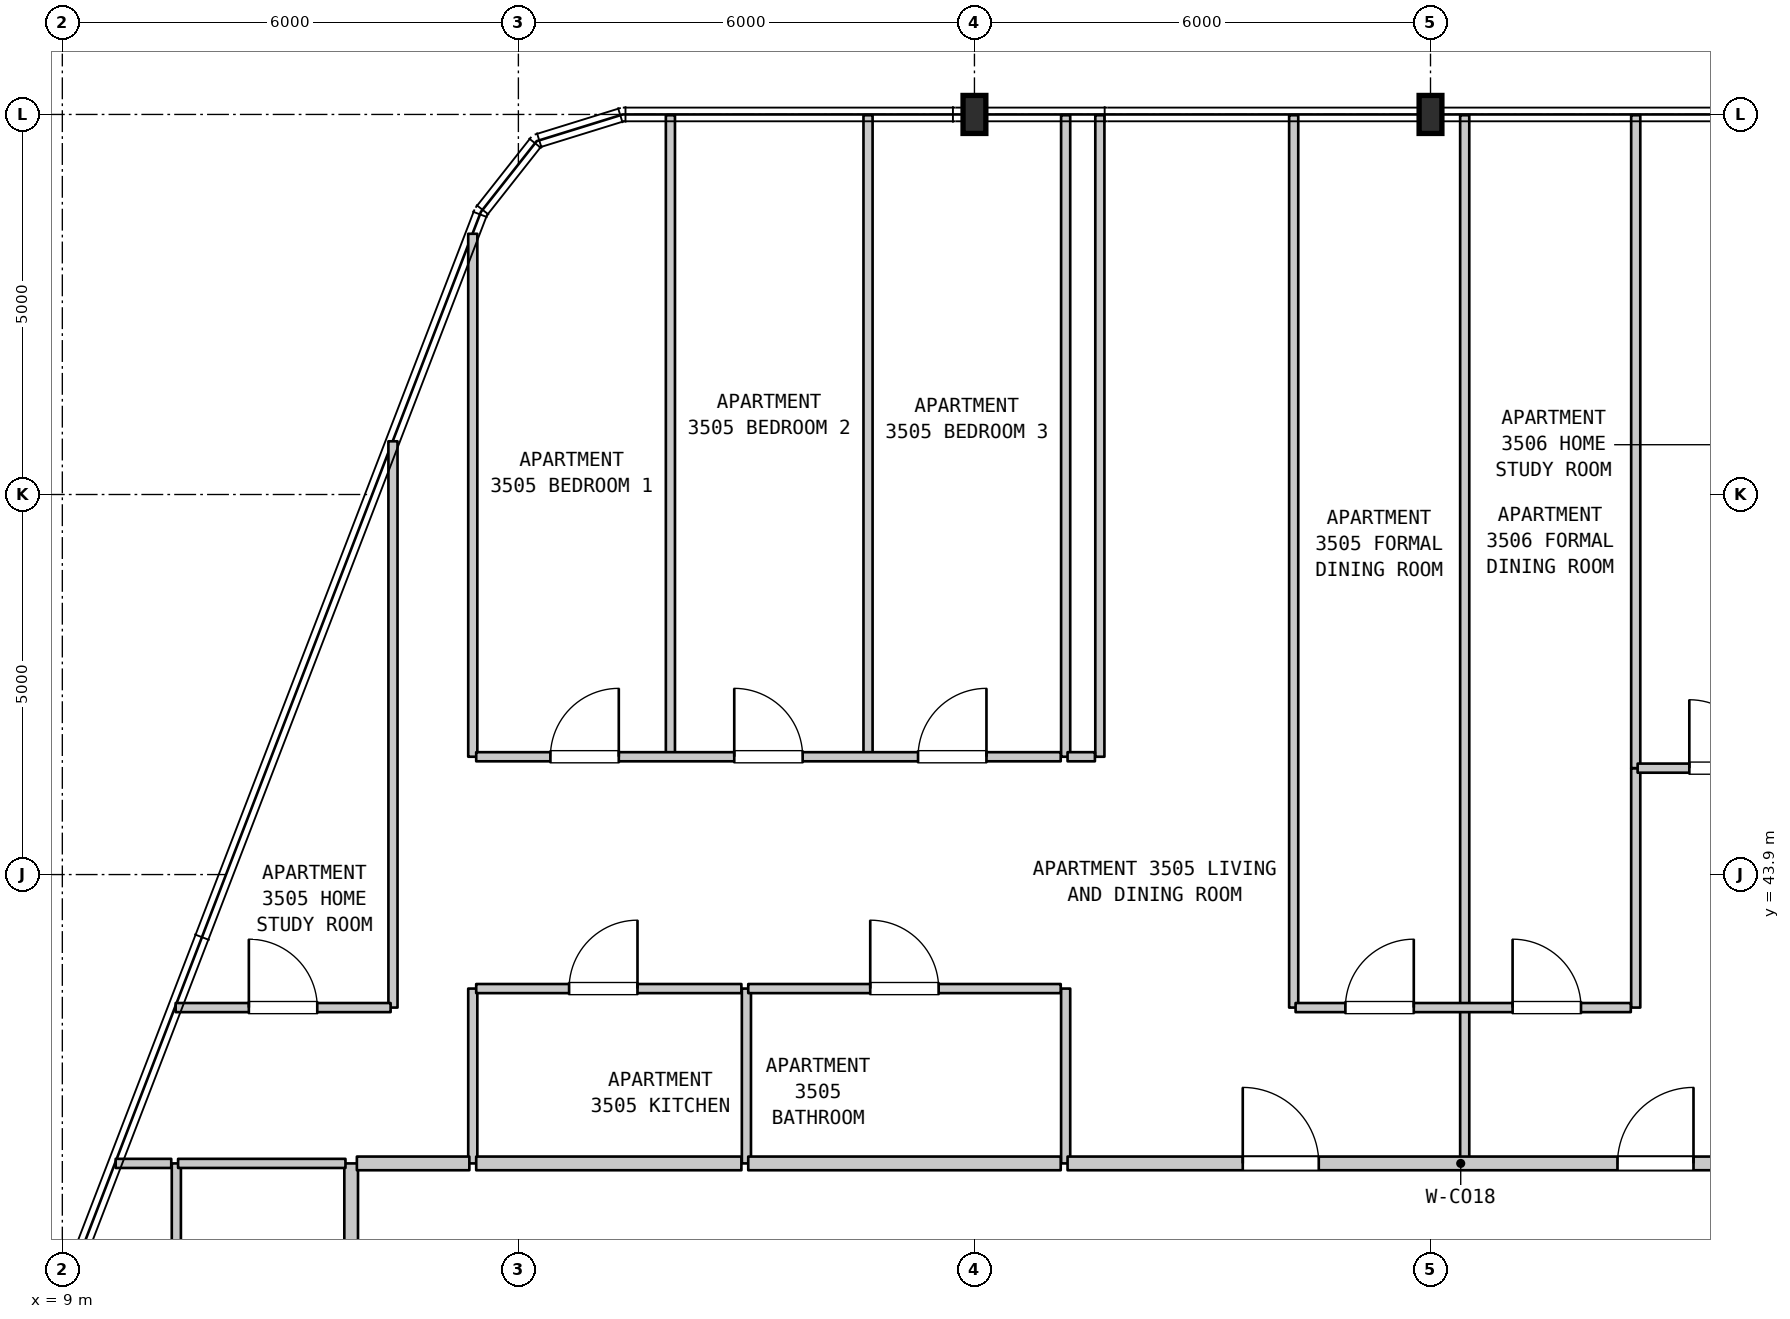
"""IFC4 building model, lengths in metres.
Left out: names, types, materials, properties, quantities, classifications, styles, units other than length and angle.
Written with IfcOpenShell. Run it as: python <this file> out.ifc"""

import sys

from ifc_helpers import new_model, si_unit, direction, frame, frame_2d, origin, origin_2d, place, context, subcontext, project, spatial, rectangle, i_section, extrude, element, fill, save


model = new_model("IFC4")
c1 = context("Model", 3, precision=1e-05, world=origin(), true_north=direction((0.0, 1.0)))
c2 = subcontext(c1, "Body", "Model", "MODEL_VIEW")
j1 = project(units=[si_unit("LENGTHUNIT", "METRE"), si_unit("PLANEANGLEUNIT", "RADIAN")], contexts=[c1])
p1 = place(None, origin())
s1 = spatial("IfcSite", under=j1, at=p1, CompositionType="ELEMENT")
p2 = place(p1, origin())
s2 = spatial("IfcBuilding", under=s1, at=p2, CompositionType="ELEMENT")
p3 = place(p2, frame((0.0, 0.0, 144.6)))
s3 = spatial("IfcBuildingStorey", under=s2, at=p3, CompositionType="ELEMENT", Elevation=144.6)
for number, where, z_axis, x_axis in (
    (1, (21.0, 53.9, 0.0), (0.0, 0.0, 1.0), (1.0, 0.0, 0.0)),
    (2, (27.0, 53.9, 0.0), (0.0, 0.0, 1.0), (1.0, 0.0, 0.0)),
):
    element("IfcColumn", number, at=place(p3, frame(where, z_axis=z_axis, x_axis=x_axis)), inside=s3, PredefinedType="COLUMN", context=c2, shape_type="SweptSolid", body=[
        extrude(i_section(OverallWidth=0.3, OverallDepth=0.5, WebThickness=0.014, FlangeThickness=0.028, FilletRadius=0.027, at=origin_2d()), origin(), (0.0, 0.0, 1.0), 3.7),
    ])
p4 = place(p3, frame((10.5, 31.09, 0.0), z_axis=(0.0, 0.0, 1.0), x_axis=(0.0, 1.0, 0.0)))
e3 = element("IfcWall", 3, at=p4, inside=s3, PredefinedType="PARTITIONING", context=c2, shape_type="SweptSolid", body=[
    extrude(rectangle(XDim=9.01, YDim=0.12, at=frame_2d((4.505, 0.0))), origin(), (0.0, 0.0, 1.0), 3.385),
])
p5 = place(p3, frame((12.8, 31.09, 0.0), z_axis=(0.0, 0.0, 1.0), x_axis=(0.0, 1.0, 0.0)))
e4 = element("IfcWall", 4, at=p5, inside=s3, PredefinedType="STANDARD", context=c2, shape_type="SweptSolid", body=[
    extrude(rectangle(XDim=9.01, YDim=0.18, at=frame_2d((4.505, 0.0))), origin(), (0.0, 0.0, 1.0), 3.385),
])
p6 = place(p3, frame((13.35, 42.15, 0.0), z_axis=(0.0, 0.0, 1.0), x_axis=(0.0, 1.0, 0.0)))
e5 = element("IfcWall", 5, at=p6, inside=s3, PredefinedType="PARTITIONING", context=c2, shape_type="SweptSolid", body=[
    extrude(rectangle(XDim=7.45, YDim=0.12, at=frame_2d((3.725, 0.0))), origin(), (0.0, 0.0, 1.0), 3.385),
])
p7 = place(p3, frame((14.4, 40.1, 0.0), z_axis=(0.0, 0.0, 1.0), x_axis=(0.0, 1.0, 0.0)))
e6 = element("IfcWall", 6, at=p7, inside=s3, PredefinedType="PARTITIONING", context=c2, shape_type="SweptSolid", body=[
    extrude(rectangle(XDim=2.3, YDim=0.12, at=frame_2d((1.15, 0.0))), origin(), (0.0, 0.0, 1.0), 3.385),
])
p8 = place(p3, frame((14.4, 45.45, 0.0), z_axis=(0.0, 0.0, 1.0), x_axis=(0.0, 1.0, 0.0)))
e7 = element("IfcWall", 7, at=p8, inside=s3, PredefinedType="PARTITIONING", context=c2, shape_type="SweptSolid", body=[
    extrude(rectangle(XDim=6.88, YDim=0.12, at=frame_2d((3.44, 0.0))), origin(), (0.0, 0.0, 1.0), 3.385),
])
p9 = place(p3, frame((17.0, 45.45, 0.0), z_axis=(0.0, 0.0, 1.0), x_axis=(0.0, 1.0, 0.0)))
e8 = element("IfcWall", 8, at=p9, inside=s3, PredefinedType="PARTITIONING", context=c2, shape_type="SweptSolid", body=[
    extrude(rectangle(XDim=8.44, YDim=0.12, at=frame_2d((4.22, 0.0))), origin(), (0.0, 0.0, 1.0), 3.385),
])
p10 = place(p3, frame((18.0, 40.1, 0.0), z_axis=(0.0, 0.0, 1.0), x_axis=(0.0, 1.0, 0.0)))
e9 = element("IfcWall", 9, at=p10, inside=s3, PredefinedType="PARTITIONING", context=c2, shape_type="SweptSolid", body=[
    extrude(rectangle(XDim=2.3, YDim=0.12, at=frame_2d((1.15, 0.0))), origin(), (0.0, 0.0, 1.0), 3.385),
])
p11 = place(p3, frame((19.6, 45.45, 0.0), z_axis=(0.0, 0.0, 1.0), x_axis=(0.0, 1.0, 0.0)))
e10 = element("IfcWall", 10, at=p11, inside=s3, PredefinedType="PARTITIONING", context=c2, shape_type="SweptSolid", body=[
    extrude(rectangle(XDim=8.44, YDim=0.12, at=frame_2d((4.22, 0.0))), origin(), (0.0, 0.0, 1.0), 3.385),
])
p12 = place(p3, frame((22.2, 40.1, 0.0), z_axis=(0.0, 0.0, 1.0), x_axis=(0.0, 1.0, 0.0)))
e11 = element("IfcWall", 11, at=p12, inside=s3, PredefinedType="PARTITIONING", context=c2, shape_type="SweptSolid", body=[
    extrude(rectangle(XDim=2.3, YDim=0.12, at=frame_2d((1.15, 0.0))), origin(), (0.0, 0.0, 1.0), 3.385),
])
for number, where, z_axis, x_axis in (
    (12, (22.2, 45.45, 0.0), (0.0, 0.0, 1.0), (0.0, 1.0, 0.0)),
    (13, (22.65, 45.45, 0.0), (0.0, 0.0, 1.0), (0.0, 1.0, 0.0)),
):
    element("IfcWall", number, at=place(p3, frame(where, z_axis=z_axis, x_axis=x_axis)), inside=s3, PredefinedType="PARTITIONING", context=c2, shape_type="SweptSolid", body=[
        extrude(rectangle(XDim=8.44, YDim=0.12, at=frame_2d((4.22, 0.0))), origin(), (0.0, 0.0, 1.0), 3.385),
    ])
p13 = place(p3, frame((25.2, 42.15, 0.0), z_axis=(0.0, 0.0, 1.0), x_axis=(0.0, 1.0, 0.0)))
e14 = element("IfcWall", 14, at=p13, inside=s3, PredefinedType="PARTITIONING", context=c2, shape_type="SweptSolid", body=[
    extrude(rectangle(XDim=11.74, YDim=0.12, at=frame_2d((5.87, 0.0))), origin(), (0.0, 0.0, 1.0), 3.385),
])
p14 = place(p3, frame((27.45, 40.1, 0.0), z_axis=(0.0, 0.0, 1.0), x_axis=(0.0, 1.0, 0.0)))
e15 = element("IfcWall", 15, at=p14, inside=s3, PredefinedType="PARTITIONING", context=c2, shape_type="SweptSolid", body=[
    extrude(rectangle(XDim=2.05, YDim=0.12, at=frame_2d((1.025, 0.0))), origin(), (0.0, 0.0, 1.0), 3.385),
])
p15 = place(p3, frame((27.45, 42.15, 0.0), z_axis=(0.0, 0.0, 1.0), x_axis=(0.0, 1.0, 0.0)))
e16 = element("IfcWall", 16, at=p15, inside=s3, PredefinedType="PARTITIONING", context=c2, shape_type="SweptSolid", body=[
    extrude(rectangle(XDim=11.74, YDim=0.12, at=frame_2d((5.87, 0.0))), origin(), (0.0, 0.0, 1.0), 3.385),
])
p16 = place(p3, frame((29.7, 42.15, 0.0), z_axis=(0.0, 0.0, 1.0), x_axis=(0.0, 1.0, 0.0)))
e17 = element("IfcWall", 17, at=p16, inside=s3, PredefinedType="PARTITIONING", context=c2, shape_type="SweptSolid", body=[
    extrude(rectangle(XDim=3.15, YDim=0.12, at=frame_2d((1.575, 0.0))), origin(), (0.0, 0.0, 1.0), 3.385),
])
p17 = place(p3, frame((29.7, 45.3, 0.0), z_axis=(0.0, 0.0, 1.0), x_axis=(0.0, 1.0, 0.0)))
e18 = element("IfcWall", 18, at=p17, inside=s3, PredefinedType="PARTITIONING", context=c2, shape_type="SweptSolid", body=[
    extrude(rectangle(XDim=8.59, YDim=0.12, at=frame_2d((4.295, 0.0))), origin(), (0.0, 0.0, 1.0), 3.385),
])
p18 = place(p3, frame((9.702, 40.1, 0.0), z_axis=(0.0, 0.0, 1.0), x_axis=(1.0, 0.0, 0.0)))
e19 = element("IfcWall", 19, at=p18, inside=s3, PredefinedType="PARTITIONING", context=c2, shape_type="SweptSolid", body=[
    extrude(rectangle(XDim=0.731, YDim=0.12, at=frame_2d((0.366, 0.0))), origin(), (0.0, 0.0, 1.0), 3.385),
])
p19 = place(p3, frame((10.523, 40.1, 0.0), z_axis=(0.0, 0.0, 1.0), x_axis=(1.0, 0.0, 0.0)))
e20 = element("IfcWall", 20, at=p19, inside=s3, PredefinedType="PARTITIONING", context=c2, shape_type="SweptSolid", body=[
    extrude(rectangle(XDim=2.202, YDim=0.12, at=frame_2d((1.101, 0.0))), origin(), (0.0, 0.0, 1.0), 3.385),
])
p20 = place(p3, frame((12.875, 40.1, 0.0), z_axis=(0.0, 0.0, 1.0), x_axis=(1.0, 0.0, 0.0)))
e21 = element("IfcWall", 21, at=p20, inside=s3, PredefinedType="STANDARD", context=c2, shape_type="SweptSolid", body=[
    extrude(rectangle(XDim=1.48, YDim=0.18, at=frame_2d((0.74, 0.0))), origin(), (0.0, 0.0, 1.0), 3.385),
])
p21 = place(p3, frame((14.445, 40.1, 0.0), z_axis=(0.0, 0.0, 1.0), x_axis=(1.0, 0.0, 0.0)))
e22 = element("IfcWall", 22, at=p21, inside=s3, PredefinedType="STANDARD", context=c2, shape_type="SweptSolid", body=[
    extrude(rectangle(XDim=3.489, YDim=0.18, at=frame_2d((1.745, 0.0))), origin(), (0.0, 0.0, 1.0), 3.385),
])
p22 = place(p3, frame((18.024, 40.1, 0.0), z_axis=(0.0, 0.0, 1.0), x_axis=(1.0, 0.0, 0.0)))
e23 = element("IfcWall", 23, at=p22, inside=s3, PredefinedType="STANDARD", context=c2, shape_type="SweptSolid", body=[
    extrude(rectangle(XDim=4.111, YDim=0.18, at=frame_2d((2.056, 0.0))), origin(), (0.0, 0.0, 1.0), 3.385),
])
p23 = place(p3, frame((22.225, 40.1, 0.0), z_axis=(0.0, 0.0, 1.0), x_axis=(1.0, 0.0, 0.0)))
e24 = element("IfcWall", 24, at=p23, inside=s3, PredefinedType="STANDARD", context=c2, shape_type="SweptSolid", body=[
    extrude(rectangle(XDim=10.345, YDim=0.18, at=frame_2d((5.172, 0.0))), origin(), (0.0, 0.0, 1.0), 3.385),
])
p24 = place(p23, frame((2.305, 0.0, 0.0)))
e25 = element("IfcOpeningElement", 25, at=p24, cuts=e24, PredefinedType="OPENING", context=c2, shape_type="SweptSolid", body=[
    extrude(rectangle(XDim=1.0, YDim=2.15, at=frame_2d((0.5, 1.075))), frame((0.0, 0.1, 0.0), z_axis=(0.0, -1.0, 0.0), x_axis=(1.0, 0.0, 0.0)), (0.0, 0.0, 1.0), 0.2),
])
p25 = place(p23, frame((7.235, 0.0, 0.0)))
e26 = element("IfcOpeningElement", 26, at=p25, cuts=e24, PredefinedType="OPENING", context=c2, shape_type="SweptSolid", body=[
    extrude(rectangle(XDim=1.0, YDim=2.15, at=frame_2d((0.5, 1.075))), frame((0.0, 0.1, 0.0), z_axis=(0.0, -1.0, 0.0), x_axis=(1.0, 0.0, 0.0)), (0.0, 0.0, 1.0), 0.2),
])
p26 = place(p3, frame((10.491, 42.15, 0.0), z_axis=(0.0, 0.0, 1.0), x_axis=(1.0, 0.0, 0.0)))
e27 = element("IfcWall", 27, at=p26, inside=s3, PredefinedType="PARTITIONING", context=c2, shape_type="SweptSolid", body=[
    extrude(rectangle(XDim=2.828, YDim=0.12, at=frame_2d((1.414, 0.0))), origin(), (0.0, 0.0, 1.0), 3.385),
])
p27 = place(p26, frame((0.963, 0.0, 0.0)))
e28 = element("IfcOpeningElement", 28, at=p27, cuts=e27, PredefinedType="OPENING", context=c2, shape_type="SweptSolid", body=[
    extrude(rectangle(XDim=0.9, YDim=2.15, at=frame_2d((0.45, 1.075))), frame((0.0, 0.07, 0.0), z_axis=(0.0, -1.0, 0.0), x_axis=(1.0, 0.0, 0.0)), (0.0, 0.0, 1.0), 0.14),
])
p28 = place(p3, frame((25.225, 42.15, 0.0), z_axis=(0.0, 0.0, 1.0), x_axis=(1.0, 0.0, 0.0)))
e29 = element("IfcWall", 29, at=p28, inside=s3, PredefinedType="PARTITIONING", context=c2, shape_type="SweptSolid", body=[
    extrude(rectangle(XDim=4.41, YDim=0.12, at=frame_2d((2.205, 0.0))), origin(), (0.0, 0.0, 1.0), 3.385),
])
p29 = place(p28, frame((0.655, 0.0, 0.0)))
e30 = element("IfcOpeningElement", 30, at=p29, cuts=e29, PredefinedType="OPENING", context=c2, shape_type="SweptSolid", body=[
    extrude(rectangle(XDim=0.9, YDim=2.15, at=frame_2d((0.45, 1.075))), frame((0.0, 0.07, 0.0), z_axis=(0.0, -1.0, 0.0), x_axis=(1.0, 0.0, 0.0)), (0.0, 0.0, 1.0), 0.14),
])
p30 = place(p28, frame((2.855, 0.0, 0.0)))
e31 = element("IfcOpeningElement", 31, at=p30, cuts=e29, PredefinedType="OPENING", context=c2, shape_type="SweptSolid", body=[
    extrude(rectangle(XDim=0.9, YDim=2.15, at=frame_2d((0.45, 1.075))), frame((0.0, 0.07, 0.0), z_axis=(0.0, -1.0, 0.0), x_axis=(1.0, 0.0, 0.0)), (0.0, 0.0, 1.0), 0.14),
])
p31 = place(p3, frame((14.445, 42.4, 0.0), z_axis=(0.0, 0.0, 1.0), x_axis=(1.0, 0.0, 0.0)))
e32 = element("IfcWall", 32, at=p31, inside=s3, PredefinedType="PARTITIONING", context=c2, shape_type="SweptSolid", body=[
    extrude(rectangle(XDim=3.489, YDim=0.12, at=frame_2d((1.745, 0.0))), origin(), (0.0, 0.0, 1.0), 3.385),
])
p32 = place(p31, frame((1.222, 0.0, 0.0)))
e33 = element("IfcOpeningElement", 33, at=p32, cuts=e32, PredefinedType="OPENING", context=c2, shape_type="SweptSolid", body=[
    extrude(rectangle(XDim=0.9, YDim=2.15, at=frame_2d((0.45, 1.075))), frame((0.0, 0.07, 0.0), z_axis=(0.0, -1.0, 0.0), x_axis=(1.0, 0.0, 0.0)), (0.0, 0.0, 1.0), 0.14),
])
p33 = place(p3, frame((18.024, 42.4, 0.0), z_axis=(0.0, 0.0, 1.0), x_axis=(1.0, 0.0, 0.0)))
e34 = element("IfcWall", 34, at=p33, inside=s3, PredefinedType="PARTITIONING", context=c2, shape_type="SweptSolid", body=[
    extrude(rectangle(XDim=4.111, YDim=0.12, at=frame_2d((2.056, 0.0))), origin(), (0.0, 0.0, 1.0), 3.385),
])
p34 = place(p33, frame((1.605, 0.0, 0.0)))
e35 = element("IfcOpeningElement", 35, at=p34, cuts=e34, PredefinedType="OPENING", context=c2, shape_type="SweptSolid", body=[
    extrude(rectangle(XDim=0.9, YDim=2.1, at=frame_2d((0.45, 1.05))), frame((0.0, 0.07, 0.0), z_axis=(0.0, -1.0, 0.0), x_axis=(1.0, 0.0, 0.0)), (0.0, 0.0, 1.0), 0.14),
])
p35 = place(p3, frame((29.725, 45.3, 0.0), z_axis=(0.0, 0.0, 1.0), x_axis=(1.0, 0.0, 0.0)))
e36 = element("IfcWall", 36, at=p35, inside=s3, PredefinedType="PARTITIONING", context=c2, shape_type="SweptSolid", body=[
    extrude(rectangle(XDim=2.26, YDim=0.12, at=frame_2d((1.13, 0.0))), origin(), (0.0, 0.0, 1.0), 3.385),
])
p36 = place(p35, frame((0.68, 0.0, 0.0)))
e37 = element("IfcOpeningElement", 37, at=p36, cuts=e36, PredefinedType="OPENING", context=c2, shape_type="SweptSolid", body=[
    extrude(rectangle(XDim=0.9, YDim=2.15, at=frame_2d((0.45, 1.075))), frame((0.0, 0.07, 0.0), z_axis=(0.0, -1.0, 0.0), x_axis=(1.0, 0.0, 0.0)), (0.0, 0.0, 1.0), 0.14),
])
p37 = place(p3, frame((14.445, 45.45, 0.0), z_axis=(0.0, 0.0, 1.0), x_axis=(1.0, 0.0, 0.0)))
e38 = element("IfcWall", 38, at=p37, inside=s3, PredefinedType="PARTITIONING", context=c2, shape_type="SweptSolid", body=[
    extrude(rectangle(XDim=7.69, YDim=0.12, at=frame_2d((3.845, 0.0))), origin(), (0.0, 0.0, 1.0), 3.385),
])
p38 = place(p37, frame((0.976, 0.0, 0.0)))
e39 = element("IfcOpeningElement", 39, at=p38, cuts=e38, PredefinedType="OPENING", context=c2, shape_type="SweptSolid", body=[
    extrude(rectangle(XDim=0.9, YDim=2.15, at=frame_2d((0.45, 1.075))), frame((0.0, 0.07, 0.0), z_axis=(0.0, -1.0, 0.0), x_axis=(1.0, 0.0, 0.0)), (0.0, 0.0, 1.0), 0.14),
])
p39 = place(p37, frame((3.395, 0.0, 0.0)))
e40 = element("IfcOpeningElement", 40, at=p39, cuts=e38, PredefinedType="OPENING", context=c2, shape_type="SweptSolid", body=[
    extrude(rectangle(XDim=0.9, YDim=2.15, at=frame_2d((0.45, 1.075))), frame((0.0, 0.07, 0.0), z_axis=(0.0, -1.0, 0.0), x_axis=(1.0, 0.0, 0.0)), (0.0, 0.0, 1.0), 0.14),
])
p40 = place(p37, frame((5.813, 0.0, 0.0)))
e41 = element("IfcOpeningElement", 41, at=p40, cuts=e38, PredefinedType="OPENING", context=c2, shape_type="SweptSolid", body=[
    extrude(rectangle(XDim=0.9, YDim=2.15, at=frame_2d((0.45, 1.075))), frame((0.0, 0.07, 0.0), z_axis=(0.0, -1.0, 0.0), x_axis=(1.0, 0.0, 0.0)), (0.0, 0.0, 1.0), 0.14),
])
p41 = place(p3, frame((22.225, 45.45, 0.0), z_axis=(0.0, 0.0, 1.0), x_axis=(1.0, 0.0, 0.0)))
e42 = element("IfcWall", 42, at=p41, inside=s3, PredefinedType="PARTITIONING", context=c2, shape_type="SweptSolid", body=[
    extrude(rectangle(XDim=0.36, YDim=0.12, at=frame_2d((0.18, 0.0))), origin(), (0.0, 0.0, 1.0), 3.385),
])
p42 = place(p24, origin())
e43 = element("IfcDoor", 43, at=p42, inside=s3, OperationType="SINGLE_SWING_LEFT", PredefinedType="DOOR", context=c2, shape_type="SweptSolid", body=[
    extrude(rectangle(XDim=1.0, YDim=2.15, at=frame_2d((0.5, 1.075))), frame((0.0, 0.025, 0.0), z_axis=(0.0, -1.0, 0.0), x_axis=(1.0, 0.0, 0.0)), (0.0, 0.0, 1.0), 0.05),
])
fill(e25, e43)
p43 = place(p25, origin())
e44 = element("IfcDoor", 44, at=p43, inside=s3, OperationType="SINGLE_SWING_RIGHT", PredefinedType="DOOR", context=c2, shape_type="SweptSolid", body=[
    extrude(rectangle(XDim=1.0, YDim=2.15, at=frame_2d((0.5, 1.075))), frame((0.0, 0.025, 0.0), z_axis=(0.0, -1.0, 0.0), x_axis=(1.0, 0.0, 0.0)), (0.0, 0.0, 1.0), 0.05),
])
fill(e26, e44)
p44 = place(p27, origin())
e45 = element("IfcDoor", 45, at=p44, inside=s3, OperationType="SINGLE_SWING_LEFT", PredefinedType="DOOR", context=c2, shape_type="SweptSolid", body=[
    extrude(rectangle(XDim=0.9, YDim=2.15, at=frame_2d((0.45, 1.075))), frame((0.0, 0.025, 0.0), z_axis=(0.0, -1.0, 0.0), x_axis=(1.0, 0.0, 0.0)), (0.0, 0.0, 1.0), 0.05),
])
fill(e28, e45)
p45 = place(p29, origin())
e46 = element("IfcDoor", 46, at=p45, inside=s3, OperationType="SINGLE_SWING_RIGHT", PredefinedType="DOOR", context=c2, shape_type="SweptSolid", body=[
    extrude(rectangle(XDim=0.9, YDim=2.15, at=frame_2d((0.45, 1.075))), frame((0.0, 0.025, 0.0), z_axis=(0.0, -1.0, 0.0), x_axis=(1.0, 0.0, 0.0)), (0.0, 0.0, 1.0), 0.05),
])
fill(e30, e46)
p46 = place(p30, origin())
e47 = element("IfcDoor", 47, at=p46, inside=s3, OperationType="SINGLE_SWING_LEFT", PredefinedType="DOOR", context=c2, shape_type="SweptSolid", body=[
    extrude(rectangle(XDim=0.9, YDim=2.15, at=frame_2d((0.45, 1.075))), frame((0.0, 0.025, 0.0), z_axis=(0.0, -1.0, 0.0), x_axis=(1.0, 0.0, 0.0)), (0.0, 0.0, 1.0), 0.05),
])
fill(e31, e47)
p47 = place(p32, origin())
e48 = element("IfcDoor", 48, at=p47, inside=s3, OperationType="SINGLE_SWING_RIGHT", PredefinedType="DOOR", context=c2, shape_type="SweptSolid", body=[
    extrude(rectangle(XDim=0.9, YDim=2.15, at=frame_2d((0.45, 1.075))), frame((0.0, 0.025, 0.0), z_axis=(0.0, -1.0, 0.0), x_axis=(1.0, 0.0, 0.0)), (0.0, 0.0, 1.0), 0.05),
])
fill(e33, e48)
p48 = place(p34, origin())
e49 = element("IfcDoor", 49, at=p48, inside=s3, OperationType="SINGLE_SWING_LEFT", PredefinedType="DOOR", context=c2, shape_type="SweptSolid", body=[
    extrude(rectangle(XDim=0.9, YDim=2.1, at=frame_2d((0.45, 1.05))), frame((0.0, 0.025, 0.0), z_axis=(0.0, -1.0, 0.0), x_axis=(1.0, 0.0, 0.0)), (0.0, 0.0, 1.0), 0.05),
])
fill(e35, e49)
p49 = place(p36, origin())
e50 = element("IfcDoor", 50, at=p49, inside=s3, OperationType="SINGLE_SWING_LEFT", PredefinedType="DOOR", context=c2, shape_type="SweptSolid", body=[
    extrude(rectangle(XDim=0.9, YDim=2.15, at=frame_2d((0.45, 1.075))), frame((0.0, 0.025, 0.0), z_axis=(0.0, -1.0, 0.0), x_axis=(1.0, 0.0, 0.0)), (0.0, 0.0, 1.0), 0.05),
])
fill(e37, e50)
p50 = place(p38, origin())
e51 = element("IfcDoor", 51, at=p50, inside=s3, OperationType="SINGLE_SWING_RIGHT", PredefinedType="DOOR", context=c2, shape_type="SweptSolid", body=[
    extrude(rectangle(XDim=0.9, YDim=2.15, at=frame_2d((0.45, 1.075))), frame((0.0, 0.025, 0.0), z_axis=(0.0, -1.0, 0.0), x_axis=(1.0, 0.0, 0.0)), (0.0, 0.0, 1.0), 0.05),
])
fill(e39, e51)
p51 = place(p39, origin())
e52 = element("IfcDoor", 52, at=p51, inside=s3, OperationType="SINGLE_SWING_LEFT", PredefinedType="DOOR", context=c2, shape_type="SweptSolid", body=[
    extrude(rectangle(XDim=0.9, YDim=2.15, at=frame_2d((0.45, 1.075))), frame((0.0, 0.025, 0.0), z_axis=(0.0, -1.0, 0.0), x_axis=(1.0, 0.0, 0.0)), (0.0, 0.0, 1.0), 0.05),
])
fill(e40, e52)
p52 = place(p40, origin())
e53 = element("IfcDoor", 53, at=p52, inside=s3, OperationType="SINGLE_SWING_RIGHT", PredefinedType="DOOR", context=c2, shape_type="SweptSolid", body=[
    extrude(rectangle(XDim=0.9, YDim=2.15, at=frame_2d((0.45, 1.075))), frame((0.0, 0.025, 0.0), z_axis=(0.0, -1.0, 0.0), x_axis=(1.0, 0.0, 0.0)), (0.0, 0.0, 1.0), 0.05),
])
fill(e41, e53)
save(model, sys.argv[1])
